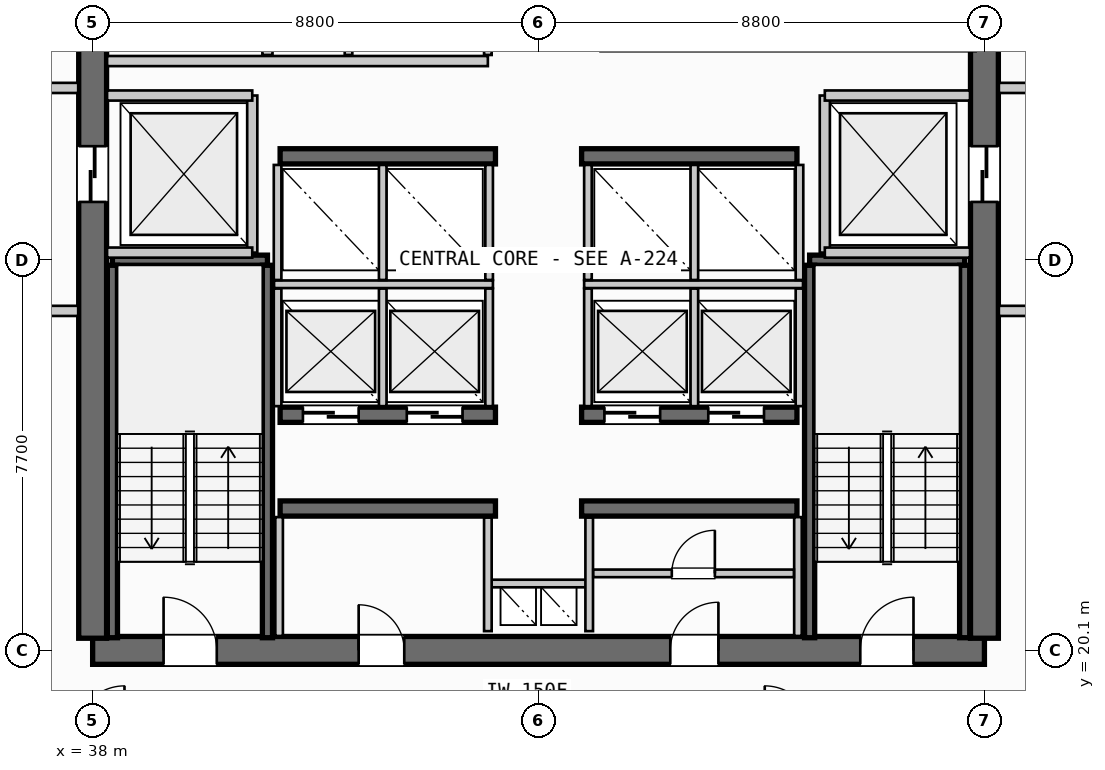
"""IFC4 building model, lengths in metres.
Left out: names, types, materials, properties, quantities, classifications, styles, units other than length and angle.
Written with IfcOpenShell. Run it as: python <this file> out.ifc"""

import sys

from ifc_helpers import new_model, si_unit, direction, frame, frame_2d, origin, place, context, subcontext, project, spatial, rectangle, extrude, source, transform, mapped, element, fill, save


model = new_model("IFC4")
c1 = context("Model", 3, precision=1e-05, world=origin(), true_north=direction((0.0, 1.0)))
c2 = subcontext(c1, "Body", "Model", "MODEL_VIEW")
j1 = project(units=[si_unit("LENGTHUNIT", "METRE"), si_unit("PLANEANGLEUNIT", "RADIAN")], contexts=[c1])
p1 = place(None, origin())
s1 = spatial("IfcSite", under=j1, at=p1, CompositionType="ELEMENT")
p2 = place(p1, origin())
s2 = spatial("IfcBuilding", under=s1, at=p2, CompositionType="ELEMENT")
p3 = place(p2, frame((0.0, 0.0, 176.4)))
s3 = spatial("IfcBuildingStorey", under=s2, at=p3, CompositionType="ELEMENT", Elevation=176.4)
p4 = place(p3, frame((38.0, 20.1, 0.0), z_axis=(0.0, 0.0, 1.0), x_axis=(1.0, 0.0, 0.0)))
e1 = element("IfcWall", 1, at=p4, inside=s3, PredefinedType="SHEAR", context=c2, shape_type="SweptSolid", body=[
    extrude(rectangle(XDim=17.6, YDim=0.55, at=frame_2d((8.8, 0.0))), origin(), (0.0, 0.0, 1.0), 3.26),
])
p5 = place(p4, frame((1.4, 0.0, 0.0)))
e2 = element("IfcOpeningElement", 2, at=p5, cuts=e1, PredefinedType="OPENING", context=c2, shape_type="SweptSolid", body=[
    extrude(rectangle(XDim=1.05, YDim=2.15, at=frame_2d((0.525, 1.075))), frame((0.0, 0.285, 0.0), z_axis=(0.0, -1.0, 0.0), x_axis=(1.0, 0.0, 0.0)), (0.0, 0.0, 1.0), 0.57),
])
p6 = place(p4, frame((15.15, 0.0, 0.0)))
e3 = element("IfcOpeningElement", 3, at=p6, cuts=e1, PredefinedType="OPENING", context=c2, shape_type="SweptSolid", body=[
    extrude(rectangle(XDim=1.05, YDim=2.15, at=frame_2d((0.525, 1.075))), frame((0.0, 0.285, 0.0), z_axis=(0.0, -1.0, 0.0), x_axis=(1.0, 0.0, 0.0)), (0.0, 0.0, 1.0), 0.57),
])
p7 = place(p4, frame((5.25, 0.0, 0.0)))
e4 = element("IfcOpeningElement", 4, at=p7, cuts=e1, PredefinedType="OPENING", context=c2, shape_type="SweptSolid", body=[
    extrude(rectangle(XDim=0.9, YDim=2.15, at=frame_2d((0.45, 1.075))), frame((0.0, 0.285, 0.0), z_axis=(0.0, -1.0, 0.0), x_axis=(1.0, 0.0, 0.0)), (0.0, 0.0, 1.0), 0.57),
])
p8 = place(p4, frame((11.4, 0.0, 0.0)))
e5 = element("IfcOpeningElement", 5, at=p8, cuts=e1, PredefinedType="OPENING", context=c2, shape_type="SweptSolid", body=[
    extrude(rectangle(XDim=0.95, YDim=2.15, at=frame_2d((0.475, 1.075))), frame((0.0, 0.285, 0.0), z_axis=(0.0, -1.0, 0.0), x_axis=(1.0, 0.0, 0.0)), (0.0, 0.0, 1.0), 0.57),
])
p9 = place(p3, frame((38.0, 35.26, 0.0), z_axis=(0.0, 0.0, 1.0), x_axis=(0.0, -1.0, 0.0)))
e6 = element("IfcWall", 6, at=p9, inside=s3, PredefinedType="SHEAR", context=c2, shape_type="SweptSolid", body=[
    extrude(rectangle(XDim=14.92, YDim=0.55, at=frame_2d((7.46, 0.0))), origin(), (0.0, 0.0, 1.0), 3.26),
])
p10 = place(p9, frame((5.21, 0.0, 0.0)))
e7 = element("IfcOpeningElement", 7, at=p10, cuts=e6, PredefinedType="OPENING", context=c2, shape_type="SweptSolid", body=[
    extrude(rectangle(XDim=1.1, YDim=2.2, at=frame_2d((0.55, 1.1))), frame((0.0, 0.285, 0.0), z_axis=(0.0, -1.0, 0.0), x_axis=(1.0, 0.0, 0.0)), (0.0, 0.0, 1.0), 0.57),
])
p11 = place(p3, frame((55.6, 20.34, 0.0), z_axis=(0.0, 0.0, 1.0), x_axis=(0.0, 1.0, 0.0)))
e8 = element("IfcWall", 8, at=p11, inside=s3, PredefinedType="SHEAR", context=c2, shape_type="SweptSolid", body=[
    extrude(rectangle(XDim=14.92, YDim=0.55, at=frame_2d((7.46, 0.0))), origin(), (0.0, 0.0, 1.0), 3.26),
])
p12 = place(p11, frame((12.71, 0.0, 0.0)))
e9 = element("IfcOpeningElement", 9, at=p12, cuts=e8, PredefinedType="OPENING", context=c2, shape_type="SweptSolid", body=[
    extrude(rectangle(XDim=1.05, YDim=2.15, at=frame_2d((0.525, 1.075))), frame((0.0, 0.285, 0.0), z_axis=(0.0, -1.0, 0.0), x_axis=(1.0, 0.0, 0.0)), (0.0, 0.0, 1.0), 0.57),
])
p13 = place(p11, frame((8.61, 0.0, 0.0)))
e10 = element("IfcOpeningElement", 10, at=p13, cuts=e8, PredefinedType="OPENING", context=c2, shape_type="SweptSolid", body=[
    extrude(rectangle(XDim=1.1, YDim=2.2, at=frame_2d((0.55, 1.1))), frame((0.0, 0.285, 0.0), z_axis=(0.0, -1.0, 0.0), x_axis=(1.0, 0.0, 0.0)), (0.0, 0.0, 1.0), 0.57),
])
for number, where, z_axis, x_axis in (
    (11, (41.7, 22.9, 0.0), (0.0, 0.0, 1.0), (1.0, 0.0, 0.0)),
    (12, (47.65, 22.9, 0.0), (0.0, 0.0, 1.0), (1.0, 0.0, 0.0)),
):
    element("IfcWall", number, at=place(p3, frame(where, z_axis=z_axis, x_axis=x_axis)), inside=s3, PredefinedType="SHEAR", context=c2, shape_type="SweptSolid", body=[
        extrude(rectangle(XDim=4.25, YDim=0.3, at=frame_2d((2.125, 0.0))), origin(), (0.0, 0.0, 1.0), 3.26),
    ])
p14 = place(p3, frame((41.7, 24.75, 0.0), z_axis=(0.0, 0.0, 1.0), x_axis=(1.0, 0.0, 0.0)))
e13 = element("IfcWall", 13, at=p14, inside=s3, PredefinedType="SHEAR", context=c2, shape_type="SweptSolid", body=[
    extrude(rectangle(XDim=4.25, YDim=0.3, at=frame_2d((2.125, 0.0))), origin(), (0.0, 0.0, 1.0), 3.26),
])
p15 = place(p14, frame((0.45, 0.0, 0.0)))
e14 = element("IfcOpeningElement", 14, at=p15, cuts=e13, PredefinedType="OPENING", context=c2, shape_type="SweptSolid", body=[
    extrude(rectangle(XDim=1.1, YDim=2.2, at=frame_2d((0.55, 1.1))), frame((0.0, 0.16, 0.0), z_axis=(0.0, -1.0, 0.0), x_axis=(1.0, 0.0, 0.0)), (0.0, 0.0, 1.0), 0.32),
])
p16 = place(p14, frame((2.5, 0.0, 0.0)))
e15 = element("IfcOpeningElement", 15, at=p16, cuts=e13, PredefinedType="OPENING", context=c2, shape_type="SweptSolid", body=[
    extrude(rectangle(XDim=1.1, YDim=2.2, at=frame_2d((0.55, 1.1))), frame((0.0, 0.16, 0.0), z_axis=(0.0, -1.0, 0.0), x_axis=(1.0, 0.0, 0.0)), (0.0, 0.0, 1.0), 0.32),
])
p17 = place(p3, frame((47.65, 24.75, 0.0), z_axis=(0.0, 0.0, 1.0), x_axis=(1.0, 0.0, 0.0)))
e16 = element("IfcWall", 16, at=p17, inside=s3, PredefinedType="SHEAR", context=c2, shape_type="SweptSolid", body=[
    extrude(rectangle(XDim=4.25, YDim=0.3, at=frame_2d((2.125, 0.0))), origin(), (0.0, 0.0, 1.0), 3.26),
])
p18 = place(p17, frame((0.45, 0.0, 0.0)))
e17 = element("IfcOpeningElement", 17, at=p18, cuts=e16, PredefinedType="OPENING", context=c2, shape_type="SweptSolid", body=[
    extrude(rectangle(XDim=1.1, YDim=2.2, at=frame_2d((0.55, 1.1))), frame((0.0, 0.16, 0.0), z_axis=(0.0, -1.0, 0.0), x_axis=(1.0, 0.0, 0.0)), (0.0, 0.0, 1.0), 0.32),
])
p19 = place(p17, frame((2.5, 0.0, 0.0)))
e18 = element("IfcOpeningElement", 18, at=p19, cuts=e16, PredefinedType="OPENING", context=c2, shape_type="SweptSolid", body=[
    extrude(rectangle(XDim=1.1, YDim=2.2, at=frame_2d((0.55, 1.1))), frame((0.0, 0.16, 0.0), z_axis=(0.0, -1.0, 0.0), x_axis=(1.0, 0.0, 0.0)), (0.0, 0.0, 1.0), 0.32),
])
for number, where, z_axis, x_axis in (
    (19, (41.7, 29.85, 0.0), (0.0, 0.0, 1.0), (1.0, 0.0, 0.0)),
    (20, (47.65, 29.85, 0.0), (0.0, 0.0, 1.0), (1.0, 0.0, 0.0)),
):
    element("IfcWall", number, at=place(p3, frame(where, z_axis=z_axis, x_axis=x_axis)), inside=s3, PredefinedType="SHEAR", context=c2, shape_type="SweptSolid", body=[
        extrude(rectangle(XDim=4.25, YDim=0.3, at=frame_2d((2.125, 0.0))), origin(), (0.0, 0.0, 1.0), 3.26),
    ])
p20 = place(p3, frame((38.39, 27.8, 0.0), z_axis=(0.0, 0.0, 1.0), x_axis=(1.0, 0.0, 0.0)))
e21 = element("IfcWall", 21, at=p20, inside=s3, PredefinedType="SHEAR", context=c2, shape_type="SweptSolid", body=[
    extrude(rectangle(XDim=3.06, YDim=0.2, at=frame_2d((1.53, 0.0))), origin(), (0.0, 0.0, 1.0), 3.26),
])
for number, where, z_axis, x_axis in (
    (22, (41.45, 27.7, 0.0), (0.0, 0.0, 1.0), (0.0, -1.0, 0.0)),
    (23, (38.39, 20.35, 0.0), (0.0, 0.0, 1.0), (0.0, 1.0, 0.0)),
):
    element("IfcWall", number, at=place(p3, frame(where, z_axis=z_axis, x_axis=x_axis)), inside=s3, PredefinedType="SHEAR", context=c2, shape_type="SweptSolid", body=[
        extrude(rectangle(XDim=7.35, YDim=0.2, at=frame_2d((3.675, 0.0))), origin(), (0.0, 0.0, 1.0), 3.26),
    ])
p21 = place(p3, frame((52.15, 27.8, 0.0), z_axis=(0.0, 0.0, 1.0), x_axis=(1.0, 0.0, 0.0)))
e24 = element("IfcWall", 24, at=p21, inside=s3, PredefinedType="SHEAR", context=c2, shape_type="SweptSolid", body=[
    extrude(rectangle(XDim=3.06, YDim=0.2, at=frame_2d((1.53, 0.0))), origin(), (0.0, 0.0, 1.0), 3.26),
])
for number, where, z_axis, x_axis in (
    (25, (55.21, 27.7, 0.0), (0.0, 0.0, 1.0), (0.0, -1.0, 0.0)),
    (26, (52.15, 20.35, 0.0), (0.0, 0.0, 1.0), (0.0, 1.0, 0.0)),
):
    element("IfcWall", number, at=place(p3, frame(where, z_axis=z_axis, x_axis=x_axis)), inside=s3, PredefinedType="SHEAR", context=c2, shape_type="SweptSolid", body=[
        extrude(rectangle(XDim=7.35, YDim=0.2, at=frame_2d((3.675, 0.0))), origin(), (0.0, 0.0, 1.0), 3.26),
    ])
p22 = place(p3, frame((45.8, 21.42, 0.0), z_axis=(0.0, 0.0, 1.0), x_axis=(1.0, 0.0, 0.0)))
e27 = element("IfcWall", 27, at=p22, inside=s3, PredefinedType="PARTITIONING", context=c2, shape_type="SweptSolid", body=[
    extrude(rectangle(XDim=2.0, YDim=0.15, at=frame_2d((1.0, 0.0))), origin(), (0.0, 0.0, 1.0), 2.28),
])
for number, where, z_axis, x_axis in (
    (28, (45.8, 20.48, 0.0), (0.0, 0.0, 1.0), (0.0, 1.0, 0.0)),
    (29, (47.8, 20.48, 0.0), (0.0, 0.0, 1.0), (0.0, 1.0, 0.0)),
):
    element("IfcWall", number, at=place(p3, frame(where, z_axis=z_axis, x_axis=x_axis)), inside=s3, PredefinedType="PARTITIONING", context=c2, shape_type="SweptSolid", body=[
        extrude(rectangle(XDim=2.24, YDim=0.15, at=frame_2d((1.12, 0.0))), origin(), (0.0, 0.0, 1.0), 2.28),
    ])
p23 = place(p3, frame((41.15, 27.95, 0.0), z_axis=(0.0, 0.0, 1.0), x_axis=(0.0, 1.0, 0.0)))
e30 = element("IfcWall", 30, at=p23, inside=s3, PredefinedType="PARTITIONING", context=c2, shape_type="SweptSolid", body=[
    extrude(rectangle(XDim=3.1, YDim=0.2, at=frame_2d((1.55, 0.0))), origin(), (0.0, 0.0, 1.0), 2.28),
])
for number, where, z_axis, x_axis in (
    (31, (38.285, 27.95, 0.0), (0.0, 0.0, 1.0), (1.0, 0.0, 0.0)),
    (32, (38.285, 31.05, 0.0), (0.0, 0.0, 1.0), (1.0, 0.0, 0.0)),
):
    element("IfcWall", number, at=place(p3, frame(where, z_axis=z_axis, x_axis=x_axis)), inside=s3, PredefinedType="PARTITIONING", context=c2, shape_type="SweptSolid", body=[
        extrude(rectangle(XDim=2.865, YDim=0.2, at=frame_2d((1.433, 0.0))), origin(), (0.0, 0.0, 1.0), 2.28),
    ])
for number, where, z_axis, x_axis in (
    (33, (34.5, 26.8, 0.0), (0.0, 0.0, 1.0), (1.0, 0.0, 0.0)),
    (34, (34.5, 31.2, 0.0), (0.0, 0.0, 1.0), (1.0, 0.0, 0.0)),
):
    element("IfcWall", number, at=place(p3, frame(where, z_axis=z_axis, x_axis=x_axis)), inside=s3, PredefinedType="PARTITIONING", context=c2, shape_type="SweptSolid", body=[
        extrude(rectangle(XDim=3.215, YDim=0.2, at=frame_2d((1.607, 0.0))), origin(), (0.0, 0.0, 1.0), 2.28),
    ])
p24 = place(p3, frame((52.45, 27.95, 0.0), z_axis=(0.0, 0.0, 1.0), x_axis=(0.0, 1.0, 0.0)))
e35 = element("IfcWall", 35, at=p24, inside=s3, PredefinedType="PARTITIONING", context=c2, shape_type="SweptSolid", body=[
    extrude(rectangle(XDim=3.1, YDim=0.2, at=frame_2d((1.55, 0.0))), origin(), (0.0, 0.0, 1.0), 2.28),
])
for number, where, z_axis, x_axis in (
    (36, (52.45, 27.95, 0.0), (0.0, 0.0, 1.0), (1.0, 0.0, 0.0)),
    (37, (52.45, 31.05, 0.0), (0.0, 0.0, 1.0), (1.0, 0.0, 0.0)),
):
    element("IfcWall", number, at=place(p3, frame(where, z_axis=z_axis, x_axis=x_axis)), inside=s3, PredefinedType="PARTITIONING", context=c2, shape_type="SweptSolid", body=[
        extrude(rectangle(XDim=2.865, YDim=0.2, at=frame_2d((1.433, 0.0))), origin(), (0.0, 0.0, 1.0), 2.28),
    ])
for number, where, z_axis, x_axis in (
    (38, (55.885, 26.8, 0.0), (0.0, 0.0, 1.0), (1.0, 0.0, 0.0)),
    (39, (55.885, 31.2, 0.0), (0.0, 0.0, 1.0), (1.0, 0.0, 0.0)),
):
    element("IfcWall", number, at=place(p3, frame(where, z_axis=z_axis, x_axis=x_axis)), inside=s3, PredefinedType="PARTITIONING", context=c2, shape_type="SweptSolid", body=[
        extrude(rectangle(XDim=3.215, YDim=0.2, at=frame_2d((1.607, 0.0))), origin(), (0.0, 0.0, 1.0), 2.28),
    ])
for number, where, z_axis, x_axis in (
    (40, (41.68, 20.385, 0.0), (0.0, 0.0, 1.0), (0.0, 1.0, 0.0)),
    (41, (51.92, 20.385, 0.0), (0.0, 0.0, 1.0), (0.0, 1.0, 0.0)),
):
    element("IfcWall", number, at=place(p3, frame(where, z_axis=z_axis, x_axis=x_axis)), inside=s3, PredefinedType="PARTITIONING", context=c2, shape_type="SweptSolid", body=[
        extrude(rectangle(XDim=2.345, YDim=0.15, at=frame_2d((1.172, 0.0))), origin(), (0.0, 0.0, 1.0), 2.28),
    ])
p25 = place(p3, frame((47.88, 21.62, 0.0), z_axis=(0.0, 0.0, 1.0), x_axis=(1.0, 0.0, 0.0)))
e42 = element("IfcWall", 42, at=p25, inside=s3, PredefinedType="PARTITIONING", context=c2, shape_type="SweptSolid", body=[
    extrude(rectangle(XDim=3.96, YDim=0.15, at=frame_2d((1.98, 0.0))), origin(), (0.0, 0.0, 1.0), 2.28),
])
p26 = place(p25, frame((1.55, 0.0, 0.0)))
e43 = element("IfcOpeningElement", 43, at=p26, cuts=e42, PredefinedType="OPENING", context=c2, shape_type="SweptSolid", body=[
    extrude(rectangle(XDim=0.85, YDim=2.15, at=frame_2d((0.425, 1.075))), frame((0.0, 0.085, 0.0), z_axis=(0.0, -1.0, 0.0), x_axis=(1.0, 0.0, 0.0)), (0.0, 0.0, 1.0), 0.17),
])
p27 = place(p3, frame((41.58, 27.325, 0.0), z_axis=(0.0, 0.0, 1.0), x_axis=(1.0, 0.0, 0.0)))
e44 = element("IfcWall", 44, at=p27, inside=s3, PredefinedType="PARTITIONING", context=c2, shape_type="SweptSolid", body=[
    extrude(rectangle(XDim=4.32, YDim=0.15, at=frame_2d((2.16, 0.0))), origin(), (0.0, 0.0, 1.0), 2.28),
])
p28 = place(p3, frame((47.7, 27.325, 0.0), z_axis=(0.0, 0.0, 1.0), x_axis=(1.0, 0.0, 0.0)))
e45 = element("IfcWall", 45, at=p28, inside=s3, PredefinedType="PARTITIONING", context=c2, shape_type="SweptSolid", body=[
    extrude(rectangle(XDim=4.32, YDim=0.15, at=frame_2d((2.16, 0.0))), origin(), (0.0, 0.0, 1.0), 2.28),
])
for number, where, z_axis, x_axis in (
    (46, (41.65, 24.92, 0.0), (0.0, 0.0, 1.0), (0.0, 1.0, 0.0)),
    (47, (43.725, 24.92, 0.0), (0.0, 0.0, 1.0), (0.0, 1.0, 0.0)),
    (48, (45.825, 24.92, 0.0), (0.0, 0.0, 1.0), (0.0, 1.0, 0.0)),
    (49, (47.775, 24.92, 0.0), (0.0, 0.0, 1.0), (0.0, 1.0, 0.0)),
    (50, (49.875, 24.92, 0.0), (0.0, 0.0, 1.0), (0.0, 1.0, 0.0)),
    (51, (51.95, 24.92, 0.0), (0.0, 0.0, 1.0), (0.0, 1.0, 0.0)),
):
    element("IfcWall", number, at=place(p3, frame(where, z_axis=z_axis, x_axis=x_axis)), inside=s3, PredefinedType="PARTITIONING", context=c2, shape_type="SweptSolid", body=[
        extrude(rectangle(XDim=2.32, YDim=0.15, at=frame_2d((1.16, 0.0))), origin(), (0.0, 0.0, 1.0), 2.28),
    ])
for number, where, z_axis, x_axis in (
    (52, (41.65, 27.41, 0.0), (0.0, 0.0, 1.0), (0.0, 1.0, 0.0)),
    (53, (43.725, 27.41, 0.0), (0.0, 0.0, 1.0), (0.0, 1.0, 0.0)),
    (54, (45.825, 27.41, 0.0), (0.0, 0.0, 1.0), (0.0, 1.0, 0.0)),
    (55, (47.775, 27.41, 0.0), (0.0, 0.0, 1.0), (0.0, 1.0, 0.0)),
    (56, (49.875, 27.41, 0.0), (0.0, 0.0, 1.0), (0.0, 1.0, 0.0)),
    (57, (51.95, 27.41, 0.0), (0.0, 0.0, 1.0), (0.0, 1.0, 0.0)),
):
    element("IfcWall", number, at=place(p3, frame(where, z_axis=z_axis, x_axis=x_axis)), inside=s3, PredefinedType="PARTITIONING", context=c2, shape_type="SweptSolid", body=[
        extrude(rectangle(XDim=2.27, YDim=0.15, at=frame_2d((1.135, 0.0))), origin(), (0.0, 0.0, 1.0), 2.28),
    ])
p29 = place(p3, frame((41.45, 31.85, 0.0), z_axis=(0.0, 0.0, 1.0), x_axis=(0.0, 1.0, 0.0)))
e58 = element("IfcWall", 58, at=p29, inside=s3, PredefinedType="PARTITIONING", context=c2, shape_type="SweptSolid", body=[
    extrude(rectangle(XDim=3.365, YDim=0.2, at=frame_2d((1.683, 0.0))), origin(), (0.0, 0.0, 1.0), 2.28),
])
p30 = place(p3, frame((38.285, 31.73, 0.0), z_axis=(0.0, 0.0, 1.0), x_axis=(1.0, 0.0, 0.0)))
e59 = element("IfcWall", 59, at=p30, inside=s3, PredefinedType="PARTITIONING", context=c2, shape_type="SweptSolid", body=[
    extrude(rectangle(XDim=7.515, YDim=0.2, at=frame_2d((3.758, 0.0))), origin(), (0.0, 0.0, 1.0), 2.28),
])
p31 = place(p3, frame((45.8, 31.85, 0.0), z_axis=(0.0, 0.0, 1.0), x_axis=(0.0, 1.0, 0.0)))
e60 = element("IfcWall", 60, at=p31, inside=s3, PredefinedType="PARTITIONING", context=c2, shape_type="SweptSolid", body=[
    extrude(rectangle(XDim=3.365, YDim=0.15, at=frame_2d((1.683, 0.0))), origin(), (0.0, 0.0, 1.0), 2.28),
])
p32 = place(p3, frame((43.05, 31.85, 0.0), z_axis=(0.0, 0.0, 1.0), x_axis=(0.0, 1.0, 0.0)))
e61 = element("IfcWall", 61, at=p32, inside=s3, PredefinedType="PLUMBINGWALL", context=c2, shape_type="SweptSolid", body=[
    extrude(rectangle(XDim=3.365, YDim=0.15, at=frame_2d((1.683, 0.0))), origin(), (0.0, 0.0, 1.0), 2.28),
])
m1 = source(origin(), c2, "Body", "SweptSolid", [
    extrude(rectangle(XDim=1.05, YDim=2.15, at=frame_2d((0.525, 1.075))), frame((0.0, 0.025, 0.0), z_axis=(0.0, -1.0, 0.0), x_axis=(1.0, 0.0, 0.0)), (0.0, 0.0, 1.0), 0.05),
])
p33 = place(p5, origin())
e62 = element("IfcDoor", 62, at=p33, inside=s3, OperationType="SINGLE_SWING_LEFT", PredefinedType="DOOR", context=c2, shape_type="MappedRepresentation", body=[
    mapped(m1, transform((0.0, 0.0, 0.0), scale=1.0)),
])
fill(e2, e62)
p34 = place(p6, origin())
e63 = element("IfcDoor", 63, at=p34, inside=s3, OperationType="SINGLE_SWING_RIGHT", PredefinedType="DOOR", context=c2, shape_type="MappedRepresentation", body=[
    mapped(m1, transform((0.0, 0.0, 0.0), scale=1.0)),
])
fill(e3, e63)
m2 = source(origin(), c2, "Body", "SweptSolid", [
    extrude(rectangle(XDim=1.1, YDim=2.2, at=frame_2d((0.55, 1.1))), frame((0.0, 0.025, 0.0), z_axis=(0.0, -1.0, 0.0), x_axis=(1.0, 0.0, 0.0)), (0.0, 0.0, 1.0), 0.05),
])
p35 = place(p10, origin())
e64 = element("IfcDoor", 64, at=p35, inside=s3, OperationType="SLIDING_TO_LEFT", PredefinedType="DOOR", context=c2, shape_type="MappedRepresentation", body=[
    mapped(m2, transform((0.0, 0.0, 0.0), scale=1.0)),
])
fill(e7, e64)
p36 = place(p13, origin())
e65 = element("IfcDoor", 65, at=p36, inside=s3, OperationType="SLIDING_TO_RIGHT", PredefinedType="DOOR", context=c2, shape_type="MappedRepresentation", body=[
    mapped(m2, transform((0.0, 0.0, 0.0), scale=1.0)),
])
fill(e10, e65)
m3 = source(origin(), c2, "Body", "SweptSolid", [
    extrude(rectangle(XDim=0.9, YDim=2.15, at=frame_2d((0.45, 1.075))), frame((0.0, 0.025, 0.0), z_axis=(0.0, -1.0, 0.0), x_axis=(1.0, 0.0, 0.0)), (0.0, 0.0, 1.0), 0.05),
])
p37 = place(p7, origin())
e66 = element("IfcDoor", 66, at=p37, inside=s3, OperationType="SINGLE_SWING_LEFT", PredefinedType="DOOR", context=c2, shape_type="MappedRepresentation", body=[
    mapped(m3, transform((0.0, 0.0, 0.0), scale=1.0)),
])
fill(e4, e66)
m4 = source(origin(), c2, "Body", "SweptSolid", [
    extrude(rectangle(XDim=0.95, YDim=2.15, at=frame_2d((0.475, 1.075))), frame((0.0, 0.025, 0.0), z_axis=(0.0, -1.0, 0.0), x_axis=(1.0, 0.0, 0.0)), (0.0, 0.0, 1.0), 0.05),
])
p38 = place(p8, origin())
e67 = element("IfcDoor", 67, at=p38, inside=s3, OperationType="SINGLE_SWING_RIGHT", PredefinedType="DOOR", context=c2, shape_type="MappedRepresentation", body=[
    mapped(m4, transform((0.0, 0.0, 0.0), scale=1.0)),
])
fill(e5, e67)
p39 = place(p15, origin())
e68 = element("IfcDoor", 68, at=p39, inside=s3, OperationType="SLIDING_TO_RIGHT", PredefinedType="DOOR", context=c2, shape_type="MappedRepresentation", body=[
    mapped(m2, transform((0.0, 0.0, 0.0), scale=1.0)),
])
fill(e14, e68)
p40 = place(p16, origin())
e69 = element("IfcDoor", 69, at=p40, inside=s3, OperationType="SLIDING_TO_RIGHT", PredefinedType="DOOR", context=c2, shape_type="MappedRepresentation", body=[
    mapped(m2, transform((0.0, 0.0, 0.0), scale=1.0)),
])
fill(e15, e69)
p41 = place(p18, origin())
e70 = element("IfcDoor", 70, at=p41, inside=s3, OperationType="SLIDING_TO_RIGHT", PredefinedType="DOOR", context=c2, shape_type="MappedRepresentation", body=[
    mapped(m2, transform((0.0, 0.0, 0.0), scale=1.0)),
])
fill(e17, e70)
p42 = place(p19, origin())
e71 = element("IfcDoor", 71, at=p42, inside=s3, OperationType="SLIDING_TO_RIGHT", PredefinedType="DOOR", context=c2, shape_type="MappedRepresentation", body=[
    mapped(m2, transform((0.0, 0.0, 0.0), scale=1.0)),
])
fill(e18, e71)
m5 = source(origin(), c2, "Body", "SweptSolid", [
    extrude(rectangle(XDim=0.85, YDim=2.15, at=frame_2d((0.425, 1.075))), frame((0.0, 0.025, 0.0), z_axis=(0.0, -1.0, 0.0), x_axis=(1.0, 0.0, 0.0)), (0.0, 0.0, 1.0), 0.05),
])
p43 = place(p26, origin())
e72 = element("IfcDoor", 72, at=p43, inside=s3, OperationType="SINGLE_SWING_RIGHT", PredefinedType="DOOR", context=c2, shape_type="MappedRepresentation", body=[
    mapped(m5, transform((0.0, 0.0, 0.0), scale=1.0)),
])
fill(e43, e72)
save(model, sys.argv[1])
